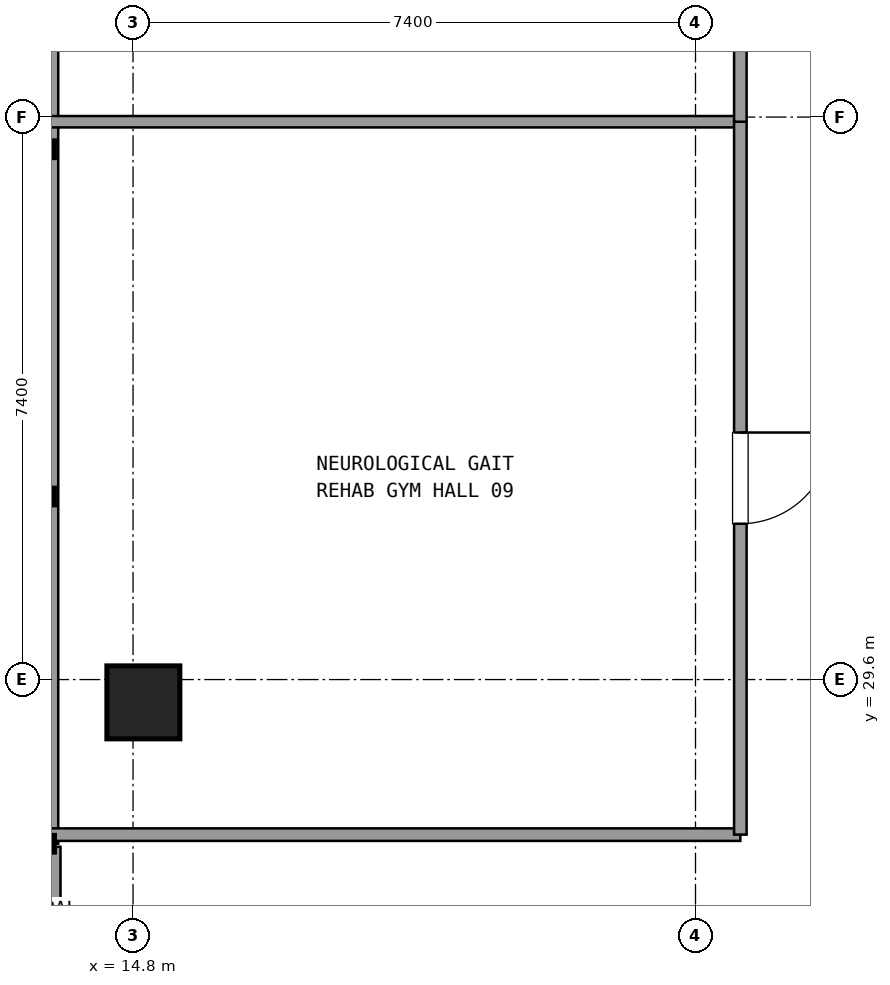
"""IFC4 building model, lengths in metres.
Left out: names, types, materials, properties, quantities, classifications, styles, units other than length and angle.
Written with IfcOpenShell. Run it as: python <this file> out.ifc"""

import sys

from ifc_helpers import new_model, si_unit, direction, frame, frame_2d, origin, origin_2d, place, context, subcontext, project, spatial, rectangle, extrude, element, fill, save


model = new_model("IFC4")
c1 = context("Model", 3, precision=1e-05, world=origin(), true_north=direction((0.0, 1.0)))
c2 = subcontext(c1, "Body", "Model", "MODEL_VIEW")
j1 = project(units=[si_unit("LENGTHUNIT", "METRE"), si_unit("PLANEANGLEUNIT", "RADIAN")], contexts=[c1])
p1 = place(None, origin())
s1 = spatial("IfcSite", under=j1, at=p1, CompositionType="ELEMENT")
p2 = place(p1, origin())
s2 = spatial("IfcBuilding", under=s1, at=p2, CompositionType="ELEMENT")
p3 = place(p2, frame((0.0, 0.0, 170.82)))
s3 = spatial("IfcBuildingStorey", under=s2, at=p3, CompositionType="ELEMENT", Elevation=170.82)
p4 = place(p3, frame((14.936, 29.3, 0.0), z_axis=(0.0, 0.0, 1.0), x_axis=(1.0, 0.0, 0.0)))
e1 = element("IfcColumn", 1, at=p4, inside=s3, PredefinedType="COLUMN", context=c2, shape_type="SweptSolid", body=[
    extrude(rectangle(XDim=0.96, YDim=0.96, at=origin_2d()), origin(), (0.0, 0.0, 1.0), 3.6),
])
p5 = place(p3, frame((13.696, 27.4, 0.0), z_axis=(0.0, 0.0, 1.0), x_axis=(0.0, -1.0, 0.0)))
e2 = element("IfcWall", 2, at=p5, inside=s3, PredefinedType="SOLIDWALL", context=c2, shape_type="SweptSolid", body=[
    extrude(rectangle(XDim=3.0, YDim=0.3, at=frame_2d((1.5, 0.0))), origin(), (0.0, 0.0, 1.0), 2.67),
])
p6 = place(p5, frame((0.9, 0.0, 0.0)))
e3 = element("IfcOpeningElement", 3, at=p6, cuts=e2, PredefinedType="OPENING", context=c2, shape_type="SweptSolid", body=[
    extrude(rectangle(XDim=1.2, YDim=2.2, at=frame_2d((0.6, 1.1))), frame((0.0, 0.16, 0.0), z_axis=(0.0, -1.0, 0.0), x_axis=(1.0, 0.0, 0.0)), (0.0, 0.0, 1.0), 0.32),
])
p7 = place(p3, frame((13.696, 41.145, 0.0), z_axis=(0.0, 0.0, 1.0), x_axis=(0.0, -1.0, 0.0)))
e4 = element("IfcWall", 4, at=p7, inside=s3, PredefinedType="SOLIDWALL", context=c2, shape_type="SweptSolid", body=[
    extrude(rectangle(XDim=13.705, YDim=0.24, at=frame_2d((6.853, 0.0))), origin(), (0.0, 0.0, 1.0), 0.85),
])
p8 = place(p3, frame((13.716, 27.56, 0.0), z_axis=(0.0, 0.0, 1.0), x_axis=(1.0, 0.0, 0.0)))
e5 = element("IfcWall", 5, at=p8, inside=s3, PredefinedType="PARTITIONING", context=c2, shape_type="SweptSolid", body=[
    extrude(rectangle(XDim=9.074, YDim=0.165, at=frame_2d((4.537, 0.0))), origin(), (0.0, 0.0, 1.0), 2.61),
])
p9 = place(p3, frame((22.79, 36.939, 0.0), z_axis=(0.0, 0.0, 1.0), x_axis=(-1.0, 0.0, 0.0)))
e6 = element("IfcWall", 6, at=p9, inside=s3, PredefinedType="PARTITIONING", context=c2, shape_type="SweptSolid", body=[
    extrude(rectangle(XDim=9.074, YDim=0.15, at=frame_2d((4.537, 0.0))), origin(), (0.0, 0.0, 1.0), 2.61),
])
p10 = place(p3, frame((22.79, 27.56, 0.0), z_axis=(0.0, 0.0, 1.0), x_axis=(0.0, 1.0, 0.0)))
e7 = element("IfcWall", 7, at=p10, inside=s3, PredefinedType="PARTITIONING", context=c2, shape_type="SweptSolid", body=[
    extrude(rectangle(XDim=9.379, YDim=0.165, at=frame_2d((4.689, 0.0))), origin(), (0.0, 0.0, 1.0), 2.61),
])
p11 = place(p10, frame((4.09, 0.0, 0.0)))
e8 = element("IfcOpeningElement", 8, at=p11, cuts=e7, PredefinedType="OPENING", context=c2, shape_type="SweptSolid", body=[
    extrude(rectangle(XDim=1.2, YDim=2.15, at=frame_2d((0.6, 1.075))), frame((0.0, 0.093, 0.0), z_axis=(0.0, -1.0, 0.0), x_axis=(1.0, 0.0, 0.0)), (0.0, 0.0, 1.0), 0.185),
])
p12 = place(p3, frame((22.79, 36.939, 0.0), z_axis=(0.0, 0.0, 1.0), x_axis=(0.0, 1.0, 0.0)))
e9 = element("IfcWall", 9, at=p12, inside=s3, PredefinedType="PARTITIONING", context=c2, shape_type="SweptSolid", body=[
    extrude(rectangle(XDim=10.161, YDim=0.165, at=frame_2d((5.081, 0.0))), origin(), (0.0, 0.0, 1.0), 2.61),
])
p13 = place(p12, frame((4.481, 0.0, 0.0)))
e10 = element("IfcOpeningElement", 10, at=p13, cuts=e9, PredefinedType="OPENING", context=c2, shape_type="SweptSolid", body=[
    extrude(rectangle(XDim=1.2, YDim=2.15, at=frame_2d((0.6, 1.075))), frame((0.0, 0.093, 0.0), z_axis=(0.0, -1.0, 0.0), x_axis=(1.0, 0.0, 0.0)), (0.0, 0.0, 1.0), 0.185),
])
p14 = place(p11, frame((1.2, 0.0, 0.0), z_axis=(0.0, 0.0, 1.0), x_axis=(-1.0, 0.0, 0.0)))
e11 = element("IfcDoor", 11, at=p14, inside=s3, OperationType="SINGLE_SWING_RIGHT", PredefinedType="DOOR", context=c2, shape_type="SweptSolid", body=[
    extrude(rectangle(XDim=1.2, YDim=2.15, at=frame_2d((0.6, 1.075))), frame((0.0, 0.025, 0.0), z_axis=(0.0, -1.0, 0.0), x_axis=(1.0, 0.0, 0.0)), (0.0, 0.0, 1.0), 0.05),
])
fill(e8, e11)
save(model, sys.argv[1])
